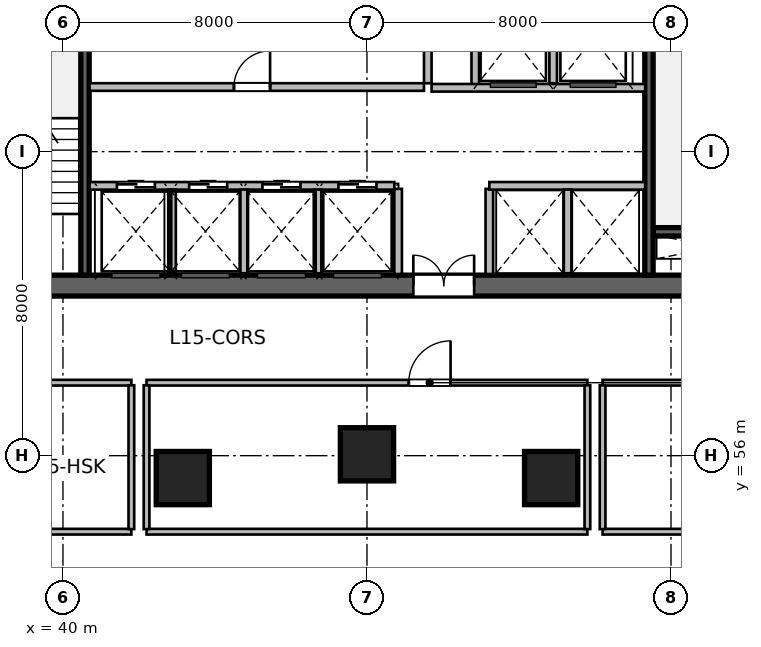
"""IFC4 building model, lengths in metres.
Left out: names, types, materials, properties, quantities, classifications, styles, units other than length and angle.
Written with IfcOpenShell. Run it as: python <this file> out.ifc"""

import sys

from ifc_helpers import new_model, si_unit, direction, frame, frame_2d, origin, origin_2d, place, context, subcontext, project, spatial, rectangle, circle, extrude, source, transform, mapped, element, fill, save


model = new_model("IFC4")
c1 = context("Model", 3, precision=1e-05, world=origin(), true_north=direction((0.0, 1.0)))
c2 = subcontext(c1, "Body", "Model", "MODEL_VIEW")
j1 = project(units=[si_unit("LENGTHUNIT", "METRE"), si_unit("PLANEANGLEUNIT", "RADIAN")], contexts=[c1])
p1 = place(None, origin())
s1 = spatial("IfcSite", under=j1, at=p1, CompositionType="ELEMENT")
p2 = place(p1, origin())
s2 = spatial("IfcBuilding", under=s1, at=p2, CompositionType="ELEMENT")
p3 = place(p2, frame((0.0, 0.0, 67.8)))
s3 = spatial("IfcBuildingStorey", under=s2, at=p3, CompositionType="ELEMENT", Elevation=67.8)
m1 = source(origin(), c2, "Body", "SweptSolid", [
    extrude(rectangle(XDim=21.6, YDim=0.55, at=frame_2d((10.8, 0.0))), origin(), (0.0, 0.0, 1.0), 3.6),
])
p4 = place(p3, frame((37.2, 60.475, 0.0), z_axis=(0.0, 0.0, 1.0), x_axis=(1.0, 0.0, 0.0)))
e1 = element("IfcWall", 1, at=p4, inside=s3, PredefinedType="SHEAR", context=c2, shape_type="MappedRepresentation", body=[
    mapped(m1, transform((0.0, 0.0, 0.0), scale=1.0)),
])
p5 = place(p4, frame((1.1, 0.0, 0.0)))
e2 = element("IfcOpeningElement", 2, at=p5, cuts=e1, PredefinedType="OPENING", context=c2, shape_type="SweptSolid", body=[
    extrude(rectangle(XDim=1.15, YDim=2.15, at=frame_2d((0.575, 1.075))), frame((0.0, 0.285, 0.0), z_axis=(0.0, -1.0, 0.0), x_axis=(1.0, 0.0, 0.0)), (0.0, 0.0, 1.0), 0.57),
])
p6 = place(p4, frame((19.5, 0.0, 0.0)))
e3 = element("IfcOpeningElement", 3, at=p6, cuts=e1, PredefinedType="OPENING", context=c2, shape_type="SweptSolid", body=[
    extrude(rectangle(XDim=0.9, YDim=2.1, at=frame_2d((0.45, 1.05))), frame((0.0, 0.285, 0.0), z_axis=(0.0, -1.0, 0.0), x_axis=(1.0, 0.0, 0.0)), (0.0, 0.0, 1.0), 0.57),
])
p7 = place(p4, frame((12.02, 0.0, 0.0)))
e4 = element("IfcOpeningElement", 4, at=p7, cuts=e1, PredefinedType="OPENING", context=c2, shape_type="SweptSolid", body=[
    extrude(rectangle(XDim=1.6, YDim=2.15, at=frame_2d((0.8, 1.075))), frame((0.0, 0.285, 0.0), z_axis=(0.0, -1.0, 0.0), x_axis=(1.0, 0.0, 0.0)), (0.0, 0.0, 1.0), 0.57),
])
m2 = source(origin(), c2, "Body", "SweptSolid", [
    extrude(rectangle(XDim=3.27, YDim=0.22, at=frame_2d((1.635, 0.0))), origin(), (0.0, 0.0, 1.0), 3.6),
])
p8 = place(p3, frame((55.53, 61.89, 0.0), z_axis=(0.0, 0.0, 1.0), x_axis=(1.0, 0.0, 0.0)))
e5 = element("IfcWall", 5, at=p8, inside=s3, PredefinedType="SHEAR", context=c2, shape_type="MappedRepresentation", body=[
    mapped(m2, transform((0.0, 0.0, 0.0), scale=1.0)),
])
m3 = source(origin(), c2, "Body", "SweptSolid", [
    extrude(rectangle(XDim=10.9, YDim=0.22, at=frame_2d((5.45, 0.0))), origin(), (0.0, 0.0, 1.0), 3.6),
])
p9 = place(p3, frame((40.58, 60.75, 0.0), z_axis=(0.0, 0.0, 1.0), x_axis=(0.0, 1.0, 0.0)))
e6 = element("IfcWall", 6, at=p9, inside=s3, PredefinedType="SHEAR", context=c2, shape_type="MappedRepresentation", body=[
    mapped(m3, transform((0.0, 0.0, 0.0), scale=1.0)),
])
p10 = place(p3, frame((55.42, 60.75, 0.0), z_axis=(0.0, 0.0, 1.0), x_axis=(0.0, 1.0, 0.0)))
e7 = element("IfcWall", 7, at=p10, inside=s3, PredefinedType="SHEAR", context=c2, shape_type="MappedRepresentation", body=[
    mapped(m3, transform((0.0, 0.0, 0.0), scale=1.0)),
])
p11 = place(p10, frame((9.495, 0.0, 0.0)))
e8 = element("IfcOpeningElement", 8, at=p11, cuts=e7, PredefinedType="OPENING", context=c2, shape_type="SweptSolid", body=[
    extrude(rectangle(XDim=1.15, YDim=2.15, at=frame_2d((0.575, 1.075))), frame((0.0, 0.12, 0.0), z_axis=(0.0, -1.0, 0.0), x_axis=(1.0, 0.0, 0.0)), (0.0, 0.0, 1.0), 0.24),
])
m4 = source(origin(), c2, "Body", "SweptSolid", [
    extrude(circle(Radius=0.7, at=origin_2d()), origin(), (0.0, 0.0, 1.0), 3.6),
])
for number, where, z_axis, x_axis in (
    (9, (43.154, 55.411, 0.0), (0.0, 0.0, 1.0), (-0.143, 0.99, 0.0)),
    (10, (48.0, 56.036, 0.0), (0.0, 0.0, 1.0), (0.0, 1.0, 0.0)),
    (11, (52.846, 55.411, 0.0), (0.0, 0.0, 1.0), (0.143, 0.99, 0.0)),
):
    element("IfcColumn", number, at=place(p3, frame(where, z_axis=z_axis, x_axis=x_axis)), inside=s3, PredefinedType="COLUMN", context=c2, shape_type="MappedRepresentation", body=[
        mapped(m4, transform((0.0, 0.0, 0.0), scale=1.0)),
    ])
m5 = source(origin(), c2, "Body", "SweptSolid", [
    extrude(rectangle(XDim=2.24, YDim=0.2, at=frame_2d((1.12, 0.0))), origin(), (0.0, 0.0, 1.0), 3.36),
])
for number, where, z_axis, x_axis in (
    (12, (48.82, 60.78, 0.0), (0.0, 0.0, 1.0), (0.0, 1.0, 0.0)),
    (13, (51.22, 60.78, 0.0), (0.0, 0.0, 1.0), (0.0, 1.0, 0.0)),
):
    element("IfcWall", number, at=place(p3, frame(where, z_axis=z_axis, x_axis=x_axis)), inside=s3, PredefinedType="SOLIDWALL", context=c2, shape_type="MappedRepresentation", body=[
        mapped(m5, transform((0.0, 0.0, 0.0), scale=1.0)),
    ])
m6 = source(origin(), c2, "Body", "SweptSolid", [
    extrude(rectangle(XDim=5.8, YDim=0.2, at=frame_2d((2.9, 0.0))), origin(), (0.0, 0.0, 1.0), 3.36),
])
p12 = place(p3, frame((49.6, 65.8, 0.0), z_axis=(0.0, 0.0, 1.0), x_axis=(0.0, 1.0, 0.0)))
e14 = element("IfcWall", 14, at=p12, inside=s3, PredefinedType="SOLIDWALL", context=c2, shape_type="MappedRepresentation", body=[
    mapped(m6, transform((0.0, 0.0, 0.0), scale=1.0)),
])
m7 = source(origin(), c2, "Body", "SweptSolid", [
    extrude(rectangle(XDim=2.58, YDim=0.2, at=frame_2d((1.29, 0.0))), origin(), (0.0, 0.0, 1.0), 3.36),
])
p13 = place(p3, frame((50.85, 65.68, 0.0), z_axis=(0.0, 0.0, 1.0), x_axis=(0.0, 1.0, 0.0)))
e15 = element("IfcWall", 15, at=p13, inside=s3, PredefinedType="SOLIDWALL", context=c2, shape_type="MappedRepresentation", body=[
    mapped(m7, transform((0.0, 0.0, 0.0), scale=1.0)),
])
m8 = source(origin(), c2, "Body", "SweptSolid", [
    extrude(rectangle(XDim=2.4, YDim=0.2, at=frame_2d((1.2, 0.0))), origin(), (0.0, 0.0, 1.0), 3.36),
])
p14 = place(p3, frame((52.9, 65.8, 0.0), z_axis=(0.0, 0.0, 1.0), x_axis=(0.0, 1.0, 0.0)))
e16 = element("IfcWall", 16, at=p14, inside=s3, PredefinedType="SOLIDWALL", context=c2, shape_type="MappedRepresentation", body=[
    mapped(m8, transform((0.0, 0.0, 0.0), scale=1.0)),
])
m9 = source(origin(), c2, "Body", "SweptSolid", [
    extrude(rectangle(XDim=5.62, YDim=0.2, at=frame_2d((2.81, 0.0))), origin(), (0.0, 0.0, 1.0), 3.36),
])
p15 = place(p3, frame((49.7, 65.68, 0.0), z_axis=(0.0, 0.0, 1.0), x_axis=(1.0, 0.0, 0.0)))
e17 = element("IfcWall", 17, at=p15, inside=s3, PredefinedType="SOLIDWALL", context=c2, shape_type="MappedRepresentation", body=[
    mapped(m9, transform((0.0, 0.0, 0.0), scale=1.0)),
])
m10 = source(origin(), c2, "Body", "SweptSolid", [
    extrude(rectangle(XDim=8.02, YDim=0.2, at=frame_2d((4.01, 0.0))), origin(), (0.0, 0.0, 1.0), 3.36),
])
p16 = place(p3, frame((40.7, 63.1, 0.0), z_axis=(0.0, 0.0, 1.0), x_axis=(1.0, 0.0, 0.0)))
e18 = element("IfcWall", 18, at=p16, inside=s3, PredefinedType="SOLIDWALL", context=c2, shape_type="MappedRepresentation", body=[
    mapped(m10, transform((0.0, 0.0, 0.0), scale=1.0)),
])
p17 = place(p16, frame((0.72, 0.0, 0.0)))
e19 = element("IfcOpeningElement", 19, at=p17, cuts=e18, PredefinedType="OPENING", context=c2, shape_type="SweptSolid", body=[
    extrude(rectangle(XDim=1.0, YDim=2.15, at=frame_2d((0.5, 1.075))), frame((0.0, 0.11, 0.0), z_axis=(0.0, -1.0, 0.0), x_axis=(1.0, 0.0, 0.0)), (0.0, 0.0, 1.0), 0.22),
])
p18 = place(p16, frame((2.62, 0.0, 0.0)))
e20 = element("IfcOpeningElement", 20, at=p18, cuts=e18, PredefinedType="OPENING", context=c2, shape_type="SweptSolid", body=[
    extrude(rectangle(XDim=1.0, YDim=2.15, at=frame_2d((0.5, 1.075))), frame((0.0, 0.11, 0.0), z_axis=(0.0, -1.0, 0.0), x_axis=(1.0, 0.0, 0.0)), (0.0, 0.0, 1.0), 0.22),
])
p19 = place(p16, frame((4.55, 0.0, 0.0)))
e21 = element("IfcOpeningElement", 21, at=p19, cuts=e18, PredefinedType="OPENING", context=c2, shape_type="SweptSolid", body=[
    extrude(rectangle(XDim=1.0, YDim=2.15, at=frame_2d((0.5, 1.075))), frame((0.0, 0.11, 0.0), z_axis=(0.0, -1.0, 0.0), x_axis=(1.0, 0.0, 0.0)), (0.0, 0.0, 1.0), 0.22),
])
p20 = place(p16, frame((6.55, 0.0, 0.0)))
e22 = element("IfcOpeningElement", 22, at=p20, cuts=e18, PredefinedType="OPENING", context=c2, shape_type="SweptSolid", body=[
    extrude(rectangle(XDim=1.0, YDim=2.15, at=frame_2d((0.5, 1.075))), frame((0.0, 0.11, 0.0), z_axis=(0.0, -1.0, 0.0), x_axis=(1.0, 0.0, 0.0)), (0.0, 0.0, 1.0), 0.22),
])
m11 = source(origin(), c2, "Body", "SweptSolid", [
    extrude(rectangle(XDim=4.1, YDim=0.2, at=frame_2d((2.05, 0.0))), origin(), (0.0, 0.0, 1.0), 3.36),
])
p21 = place(p3, frame((51.22, 63.1, 0.0), z_axis=(0.0, 0.0, 1.0), x_axis=(1.0, 0.0, 0.0)))
e23 = element("IfcWall", 23, at=p21, inside=s3, PredefinedType="SOLIDWALL", context=c2, shape_type="MappedRepresentation", body=[
    mapped(m11, transform((0.0, 0.0, 0.0), scale=1.0)),
])
m12 = source(origin(), c2, "Body", "SweptSolid", [
    extrude(rectangle(XDim=2.2, YDim=0.2, at=frame_2d((1.1, 0.0))), origin(), (0.0, 0.0, 1.0), 3.36),
])
for number, where, z_axis, x_axis in (
    (24, (42.87, 60.8, 0.0), (0.0, 0.0, 1.0), (0.0, 1.0, 0.0)),
    (25, (44.77, 60.8, 0.0), (0.0, 0.0, 1.0), (0.0, 1.0, 0.0)),
    (26, (46.7, 60.8, 0.0), (0.0, 0.0, 1.0), (0.0, 1.0, 0.0)),
    (27, (53.28, 60.8, 0.0), (0.0, 0.0, 1.0), (0.0, 1.0, 0.0)),
):
    element("IfcWall", number, at=place(p3, frame(where, z_axis=z_axis, x_axis=x_axis)), inside=s3, PredefinedType="SOLIDWALL", context=c2, shape_type="MappedRepresentation", body=[
        mapped(m12, transform((0.0, 0.0, 0.0), scale=1.0)),
    ])
m13 = source(origin(), c2, "Body", "SweptSolid", [
    extrude(rectangle(XDim=8.8, YDim=0.2, at=frame_2d((4.4, 0.0))), origin(), (0.0, 0.0, 1.0), 3.36),
])
p22 = place(p3, frame((40.7, 65.7, 0.0), z_axis=(0.0, 0.0, 1.0), x_axis=(1.0, 0.0, 0.0)))
e28 = element("IfcWall", 28, at=p22, inside=s3, PredefinedType="SOLIDWALL", context=c2, shape_type="MappedRepresentation", body=[
    mapped(m13, transform((0.0, 0.0, 0.0), scale=1.0)),
])
p23 = place(p22, frame((3.8, 0.0, 0.0)))
e29 = element("IfcOpeningElement", 29, at=p23, cuts=e28, PredefinedType="OPENING", context=c2, shape_type="SweptSolid", body=[
    extrude(rectangle(XDim=0.95, YDim=2.15, at=frame_2d((0.475, 1.075))), frame((0.0, 0.11, 0.0), z_axis=(0.0, -1.0, 0.0), x_axis=(1.0, 0.0, 0.0)), (0.0, 0.0, 1.0), 0.22),
])
m14 = source(origin(), c2, "Body", "SweptSolid", [
    extrude(rectangle(XDim=6.6, YDim=0.15, at=frame_2d((3.3, 0.0))), origin(), (0.0, 0.0, 1.0), 2.803),
])
p24 = place(p3, frame((35.2, 54.0, 0.0), z_axis=(0.0, 0.0, 1.0), x_axis=(1.0, 0.0, 0.0)))
e30 = element("IfcWall", 30, at=p24, inside=s3, PredefinedType="PARTITIONING", context=c2, shape_type="MappedRepresentation", body=[
    mapped(m14, transform((0.0, 0.0, 0.0), scale=1.0)),
])
m15 = source(origin(), c2, "Body", "SweptSolid", [
    extrude(rectangle(XDim=6.6, YDim=0.15, at=frame_2d((3.3, 0.0))), origin(), (0.0, 0.0, 1.0), 3.36),
])
p25 = place(p3, frame((35.2, 57.92, 0.0), z_axis=(0.0, 0.0, 1.0), x_axis=(1.0, 0.0, 0.0)))
e31 = element("IfcWall", 31, at=p25, inside=s3, PredefinedType="PARTITIONING", context=c2, shape_type="MappedRepresentation", body=[
    mapped(m15, transform((0.0, 0.0, 0.0), scale=1.0)),
])
p26 = place(p25, frame((2.85, 0.0, 0.0)))
e32 = element("IfcOpeningElement", 32, at=p26, cuts=e31, PredefinedType="OPENING", context=c2, shape_type="SweptSolid", body=[
    extrude(rectangle(XDim=0.9, YDim=2.1, at=frame_2d((0.45, 1.05))), frame((0.0, 0.085, 0.0), z_axis=(0.0, -1.0, 0.0), x_axis=(1.0, 0.0, 0.0)), (0.0, 0.0, 1.0), 0.17),
])
m16 = source(origin(), c2, "Body", "SweptSolid", [
    extrude(rectangle(XDim=3.785, YDim=0.15, at=frame_2d((1.893, 0.0))), origin(), (0.0, 0.0, 1.0), 3.36),
])
p27 = place(p3, frame((41.8, 54.067, 0.0), z_axis=(0.0, 0.0, 1.0), x_axis=(0.0, 1.0, 0.0)))
e33 = element("IfcWall", 33, at=p27, inside=s3, PredefinedType="PARTITIONING", context=c2, shape_type="MappedRepresentation", body=[
    mapped(m16, transform((0.0, 0.0, 0.0), scale=1.0)),
])
m17 = source(origin(), c2, "Body", "SweptSolid", [
    extrude(rectangle(XDim=11.6, YDim=0.15, at=frame_2d((5.8, 0.0))), origin(), (0.0, 0.0, 1.0), 3.36),
])
p28 = place(p3, frame((42.2, 54.0, 0.0), z_axis=(0.0, 0.0, 1.0), x_axis=(1.0, 0.0, 0.0)))
e34 = element("IfcWall", 34, at=p28, inside=s3, PredefinedType="PARTITIONING", context=c2, shape_type="MappedRepresentation", body=[
    mapped(m17, transform((0.0, 0.0, 0.0), scale=1.0)),
])
p29 = place(p3, frame((42.2, 57.92, 0.0), z_axis=(0.0, 0.0, 1.0), x_axis=(1.0, 0.0, 0.0)))
e35 = element("IfcWall", 35, at=p29, inside=s3, PredefinedType="PARTITIONING", context=c2, shape_type="MappedRepresentation", body=[
    mapped(m17, transform((0.0, 0.0, 0.0), scale=1.0)),
])
p30 = place(p29, frame((6.9, 0.0, 0.0)))
e36 = element("IfcOpeningElement", 36, at=p30, cuts=e35, PredefinedType="OPENING", context=c2, shape_type="SweptSolid", body=[
    extrude(rectangle(XDim=1.1, YDim=2.15, at=frame_2d((0.55, 1.075))), frame((0.0, 0.085, 0.0), z_axis=(0.0, -1.0, 0.0), x_axis=(1.0, 0.0, 0.0)), (0.0, 0.0, 1.0), 0.17),
])
for number, where, z_axis, x_axis in (
    (37, (42.2, 54.067, 0.0), (0.0, 0.0, 1.0), (0.0, 1.0, 0.0)),
    (38, (53.8, 54.067, 0.0), (0.0, 0.0, 1.0), (0.0, 1.0, 0.0)),
):
    element("IfcWall", number, at=place(p3, frame(where, z_axis=z_axis, x_axis=x_axis)), inside=s3, PredefinedType="PARTITIONING", context=c2, shape_type="MappedRepresentation", body=[
        mapped(m16, transform((0.0, 0.0, 0.0), scale=1.0)),
    ])
p31 = place(p3, frame((54.2, 54.0, 0.0), z_axis=(0.0, 0.0, 1.0), x_axis=(1.0, 0.0, 0.0)))
e39 = element("IfcWall", 39, at=p31, inside=s3, PredefinedType="PARTITIONING", context=c2, shape_type="MappedRepresentation", body=[
    mapped(m14, transform((0.0, 0.0, 0.0), scale=1.0)),
])
p32 = place(p3, frame((54.2, 57.92, 0.0), z_axis=(0.0, 0.0, 1.0), x_axis=(1.0, 0.0, 0.0)))
e40 = element("IfcWall", 40, at=p32, inside=s3, PredefinedType="PARTITIONING", context=c2, shape_type="MappedRepresentation", body=[
    mapped(m15, transform((0.0, 0.0, 0.0), scale=1.0)),
])
p33 = place(p32, frame((2.825, 0.0, 0.0)))
e41 = element("IfcOpeningElement", 41, at=p33, cuts=e40, PredefinedType="OPENING", context=c2, shape_type="SweptSolid", body=[
    extrude(rectangle(XDim=0.95, YDim=2.1, at=frame_2d((0.475, 1.05))), frame((0.0, 0.085, 0.0), z_axis=(0.0, -1.0, 0.0), x_axis=(1.0, 0.0, 0.0)), (0.0, 0.0, 1.0), 0.17),
])
p34 = place(p3, frame((54.2, 54.067, 0.0), z_axis=(0.0, 0.0, 1.0), x_axis=(0.0, 1.0, 0.0)))
e42 = element("IfcWall", 42, at=p34, inside=s3, PredefinedType="PARTITIONING", context=c2, shape_type="MappedRepresentation", body=[
    mapped(m16, transform((0.0, 0.0, 0.0), scale=1.0)),
])
m18 = source(origin(), c2, "Body", "SweptSolid", [
    extrude(rectangle(XDim=1.6, YDim=2.15, at=frame_2d((0.8, 1.075))), frame((0.0, 0.025, 0.0), z_axis=(0.0, -1.0, 0.0), x_axis=(1.0, 0.0, 0.0)), (0.0, 0.0, 1.0), 0.05),
])
p35 = place(p7, origin())
e43 = element("IfcDoor", 43, at=p35, inside=s3, OperationType="DOUBLE_DOOR_SINGLE_SWING", PredefinedType="DOOR", context=c2, shape_type="MappedRepresentation", body=[
    mapped(m18, transform((0.0, 0.0, 0.0), scale=1.0)),
])
fill(e4, e43)
m19 = source(origin(), c2, "Body", "SweptSolid", [
    extrude(rectangle(XDim=1.0, YDim=2.15, at=frame_2d((0.5, 1.075))), frame((0.0, 0.025, 0.0), z_axis=(0.0, -1.0, 0.0), x_axis=(1.0, 0.0, 0.0)), (0.0, 0.0, 1.0), 0.05),
])
p36 = place(p17, origin())
e44 = element("IfcDoor", 44, at=p36, inside=s3, OperationType="DOUBLE_DOOR_SLIDING", PredefinedType="DOOR", context=c2, shape_type="MappedRepresentation", body=[
    mapped(m19, transform((0.0, 0.0, 0.0), scale=1.0)),
])
fill(e19, e44)
p37 = place(p18, origin())
e45 = element("IfcDoor", 45, at=p37, inside=s3, OperationType="DOUBLE_DOOR_SLIDING", PredefinedType="DOOR", context=c2, shape_type="MappedRepresentation", body=[
    mapped(m19, transform((0.0, 0.0, 0.0), scale=1.0)),
])
fill(e20, e45)
p38 = place(p19, origin())
e46 = element("IfcDoor", 46, at=p38, inside=s3, OperationType="DOUBLE_DOOR_SLIDING", PredefinedType="DOOR", context=c2, shape_type="MappedRepresentation", body=[
    mapped(m19, transform((0.0, 0.0, 0.0), scale=1.0)),
])
fill(e21, e46)
p39 = place(p20, origin())
e47 = element("IfcDoor", 47, at=p39, inside=s3, OperationType="DOUBLE_DOOR_SLIDING", PredefinedType="DOOR", context=c2, shape_type="MappedRepresentation", body=[
    mapped(m19, transform((0.0, 0.0, 0.0), scale=1.0)),
])
fill(e22, e47)
m20 = source(origin(), c2, "Body", "SweptSolid", [
    extrude(rectangle(XDim=0.95, YDim=2.15, at=frame_2d((0.475, 1.075))), frame((0.0, 0.025, 0.0), z_axis=(0.0, -1.0, 0.0), x_axis=(1.0, 0.0, 0.0)), (0.0, 0.0, 1.0), 0.05),
])
p40 = place(p23, origin())
e48 = element("IfcDoor", 48, at=p40, inside=s3, OperationType="SINGLE_SWING_RIGHT", PredefinedType="DOOR", context=c2, shape_type="MappedRepresentation", body=[
    mapped(m20, transform((0.0, 0.0, 0.0), scale=1.0)),
])
fill(e29, e48)
m21 = source(origin(), c2, "Body", "SweptSolid", [
    extrude(rectangle(XDim=1.1, YDim=2.15, at=frame_2d((0.55, 1.075))), frame((0.0, 0.025, 0.0), z_axis=(0.0, -1.0, 0.0), x_axis=(1.0, 0.0, 0.0)), (0.0, 0.0, 1.0), 0.05),
])
p41 = place(p30, origin())
e49 = element("IfcDoor", 49, at=p41, inside=s3, OperationType="SINGLE_SWING_RIGHT", PredefinedType="DOOR", context=c2, shape_type="MappedRepresentation", body=[
    mapped(m21, transform((0.0, 0.0, 0.0), scale=1.0)),
])
fill(e36, e49)
save(model, sys.argv[1])
